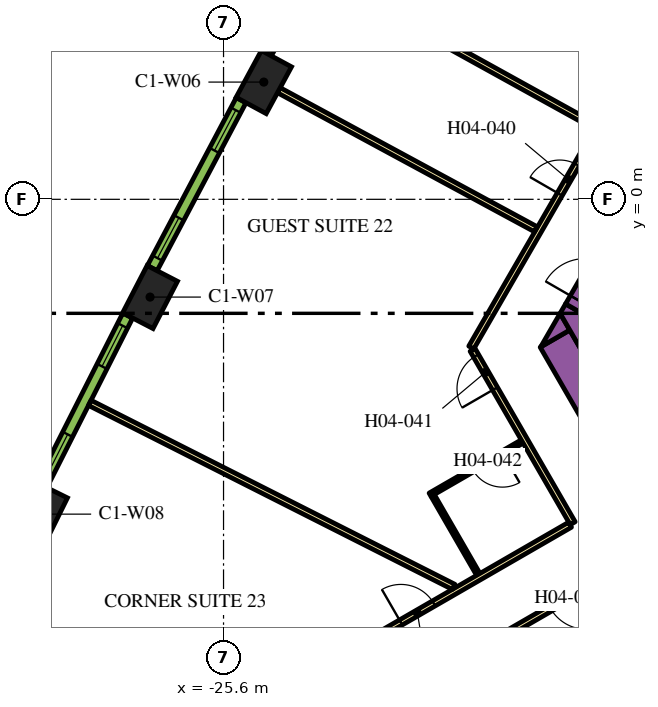
"""IFC4 building model, lengths in metres.
Left out: names, types, materials, properties, quantities, classifications, styles, units other than length and angle.
Written with IfcOpenShell. Run it as: python <this file> out.ifc"""

import sys

from ifc_helpers import new_model, si_unit, direction, frame, frame_2d, origin, origin_2d, place, context, subcontext, project, spatial, polyline, rectangle, outline, extrude, element, fill, save


model = new_model("IFC4")
c1 = context("Model", 3, precision=1e-05, world=origin(), true_north=direction((0.0, 1.0)))
c2 = subcontext(c1, "Body", "Model", "MODEL_VIEW")
j1 = project(units=[si_unit("LENGTHUNIT", "METRE"), si_unit("PLANEANGLEUNIT", "RADIAN")], contexts=[c1])
p1 = place(None, origin())
s1 = spatial("IfcSite", under=j1, at=p1, CompositionType="ELEMENT")
p2 = place(p1, origin())
s2 = spatial("IfcBuilding", under=s1, at=p2, CompositionType="ELEMENT")
p3 = place(p2, frame((0.0, 0.0, 66.6)))
s3 = spatial("IfcBuildingStorey", under=s2, at=p3, CompositionType="ELEMENT", Elevation=66.6)
for number, where, z_axis, x_axis in (
    (1, (-24.54, 3.085, 0.0), (0.0, 0.0, 1.0), (-0.476, -0.88, 0.0)),
    (2, (-27.533, -2.572, 0.0), (0.0, 0.0, 1.0), (-0.459, -0.888, 0.0)),
    (3, (-30.421, -8.284, 0.0), (0.0, 0.0, 1.0), (-0.443, -0.897, 0.0)),
):
    element("IfcColumn", number, at=place(p3, frame(where, z_axis=z_axis, x_axis=x_axis)), inside=s3, PredefinedType="COLUMN", context=c2, shape_type="SweptSolid", body=[
        extrude(rectangle(XDim=1.4, YDim=0.9, at=origin_2d()), origin(), (0.0, 0.0, 1.0), 3.9),
    ])
p4 = place(p3, frame((-12.134, -11.883, 0.0), z_axis=(0.0, 0.0, 1.0), x_axis=(-0.500005339912, 0.866022320763, 0.0)))
e4 = element("IfcWall", 4, at=p4, inside=s3, PredefinedType="SOLIDWALL", context=c2, shape_type="SweptSolid", body=[
    extrude(rectangle(XDim=9.488, YDim=0.9, at=frame_2d((4.744, 0.0))), origin(), (0.0, 0.0, 1.0), 3.9),
])
p5 = place(p3, origin())
e5 = element("IfcWall", 5, at=p5, inside=s3, PredefinedType="SOLIDWALL", context=c2, shape_type="SweptSolid", body=[
    extrude(outline(polyline([(-16.489, -3.44), (-17.251, -3.88), (-16.743, -3.0), (-16.489, -3.44)])), origin(), (0.0, 0.0, 1.0), 3.9),
])
e6 = element("IfcWall", 6, at=p5, inside=s3, PredefinedType="SOLIDWALL", context=c2, shape_type="SweptSolid", body=[
    extrude(outline(polyline([(-15.82, -3.201), (-16.223, -3.9), (-16.743, -3.0), (-16.599, -2.751), (-15.82, -3.201)])), origin(), (0.0, 0.0, 1.0), 3.9),
])
p6 = place(p3, frame((-16.209, -2.976, 0.0), z_axis=(0.0, 0.0, 1.0), x_axis=(0.499954529098, 0.86605165483, 0.0)))
e7 = element("IfcWall", 7, at=p6, inside=s3, PredefinedType="SOLIDWALL", context=c2, shape_type="SweptSolid", body=[
    extrude(rectangle(XDim=1.7, YDim=0.9, at=frame_2d((0.85, 0.0))), origin(), (0.0, 0.0, 1.0), 3.9),
])
p7 = place(p6, frame((0.25, 0.0, 0.0)))
e8 = element("IfcOpeningElement", 8, at=p7, cuts=e7, PredefinedType="OPENING", context=c2, shape_type="SweptSolid", body=[
    extrude(rectangle(XDim=1.2, YDim=2.1, at=frame_2d((0.6, 1.05))), frame((0.0, 0.46, 0.0), z_axis=(0.0, -1.0, 0.0), x_axis=(1.0, 0.0, 0.0)), (0.0, 0.0, 1.0), 0.92),
])
p8 = place(p3, frame((-19.081, -3.9, 0.0), z_axis=(0.0, 0.0, 1.0), x_axis=(0.499998313975, 0.866026377209, 0.0)))
e9 = element("IfcWall", 9, at=p8, inside=s3, PredefinedType="PARTITIONING", context=c2, shape_type="SweptSolid", body=[
    extrude(rectangle(XDim=25.766, YDim=0.15, at=frame_2d((12.883, 0.0))), origin(), (0.0, 0.0, 1.0), 2.75),
])
p9 = place(p8, frame((24.586, 0.0, 0.0)))
e10 = element("IfcOpeningElement", 10, at=p9, cuts=e9, PredefinedType="OPENING", context=c2, shape_type="SweptSolid", body=[
    extrude(rectangle(XDim=1.0, YDim=2.1, at=frame_2d((0.5, 1.05))), frame((0.0, 0.085, 0.0), z_axis=(0.0, -1.0, 0.0), x_axis=(1.0, 0.0, 0.0)), (0.0, 0.0, 1.0), 0.17),
])
p10 = place(p8, frame((9.948, 0.0, 0.0)))
e11 = element("IfcOpeningElement", 11, at=p10, cuts=e9, PredefinedType="OPENING", context=c2, shape_type="SweptSolid", body=[
    extrude(rectangle(XDim=1.0, YDim=2.1, at=frame_2d((0.5, 1.05))), frame((0.0, 0.085, 0.0), z_axis=(0.0, -1.0, 0.0), x_axis=(1.0, 0.0, 0.0)), (0.0, 0.0, 1.0), 0.17),
])
p11 = place(p8, frame((7.782, 0.0, 0.0)))
e12 = element("IfcOpeningElement", 12, at=p11, cuts=e9, PredefinedType="OPENING", context=c2, shape_type="SweptSolid", body=[
    extrude(rectangle(XDim=0.9, YDim=2.1, at=frame_2d((0.45, 1.05))), frame((0.0, 0.085, 0.0), z_axis=(0.0, -1.0, 0.0), x_axis=(1.0, 0.0, 0.0)), (0.0, 0.0, 1.0), 0.17),
])
p12 = place(p8, frame((4.658, 0.0, 0.0)))
e13 = element("IfcOpeningElement", 13, at=p12, cuts=e9, PredefinedType="OPENING", context=c2, shape_type="SweptSolid", body=[
    extrude(rectangle(XDim=0.9, YDim=2.1, at=frame_2d((0.45, 1.05))), frame((0.0, 0.085, 0.0), z_axis=(0.0, -1.0, 0.0), x_axis=(1.0, 0.0, 0.0)), (0.0, 0.0, 1.0), 0.17),
])
p13 = place(p3, frame((-16.412, -8.523, 0.0), z_axis=(0.0, 0.0, 1.0), x_axis=(-0.500001929737, 0.866024289647, 0.0)))
e14 = element("IfcWall", 14, at=p13, inside=s3, PredefinedType="PARTITIONING", context=c2, shape_type="SweptSolid", body=[
    extrude(rectangle(XDim=5.268, YDim=0.15, at=frame_2d((2.634, 0.0))), origin(), (0.0, 0.0, 1.0), 2.75),
])
p14 = place(p13, frame((4.088, 0.0, 0.0)))
e15 = element("IfcOpeningElement", 15, at=p14, cuts=e14, PredefinedType="OPENING", context=c2, shape_type="SweptSolid", body=[
    extrude(rectangle(XDim=1.0, YDim=2.1, at=frame_2d((0.5, 1.05))), frame((0.0, 0.085, 0.0), z_axis=(0.0, -1.0, 0.0), x_axis=(1.0, 0.0, 0.0)), (0.0, 0.0, 1.0), 0.17),
])
p15 = place(p3, frame((-30.463, -16.635, 0.0), z_axis=(0.0, 0.0, 1.0), x_axis=(0.866022394896, 0.500005211512, 0.0)))
e16 = element("IfcWall", 16, at=p15, inside=s3, PredefinedType="PARTITIONING", context=c2, shape_type="SweptSolid", body=[
    extrude(rectangle(XDim=16.144, YDim=0.15, at=frame_2d((8.072, 0.0))), origin(), (0.0, 0.0, 1.0), 2.75),
])
p16 = place(p15, frame((11.004, 0.0, 0.0)))
e17 = element("IfcOpeningElement", 17, at=p16, cuts=e16, PredefinedType="OPENING", context=c2, shape_type="SweptSolid", body=[
    extrude(rectangle(XDim=1.0, YDim=2.1, at=frame_2d((0.5, 1.05))), frame((0.0, 0.085, 0.0), z_axis=(0.0, -1.0, 0.0), x_axis=(1.0, 0.0, 0.0)), (0.0, 0.0, 1.0), 0.17),
])
p17 = place(p3, frame((-15.587, -9.952, 0.0), z_axis=(0.0, 0.0, 1.0), x_axis=(-0.866022197818, -0.500005552856, 0.0)))
e18 = element("IfcWall", 18, at=p17, inside=s3, PredefinedType="PARTITIONING", context=c2, shape_type="SweptSolid", body=[
    extrude(rectangle(XDim=16.224, YDim=0.15, at=frame_2d((8.112, 0.0))), origin(), (0.0, 0.0, 1.0), 2.75),
])
p18 = place(p17, frame((0.527, 0.0, 0.0)))
e19 = element("IfcOpeningElement", 19, at=p18, cuts=e18, PredefinedType="OPENING", context=c2, shape_type="SweptSolid", body=[
    extrude(rectangle(XDim=1.1, YDim=2.1, at=frame_2d((0.55, 1.05))), frame((0.0, 0.085, 0.0), z_axis=(0.0, -1.0, 0.0), x_axis=(1.0, 0.0, 0.0)), (0.0, 0.0, 1.0), 0.17),
])
p19 = place(p3, frame((-29.12, -5.356, 0.0), z_axis=(0.0, 0.0, 1.0), x_axis=(0.892401965553, -0.451241323327, 0.0)))
e20 = element("IfcWall", 20, at=p19, inside=s3, PredefinedType="PARTITIONING", context=c2, shape_type="SweptSolid", body=[
    extrude(rectangle(XDim=10.729, YDim=0.15, at=frame_2d((5.364, 0.0))), origin(), (0.0, 0.0, 1.0), 2.75),
])
p20 = place(p3, frame((-24.145, 2.871, 0.0), z_axis=(0.0, 0.0, 1.0), x_axis=(0.879551725039, -0.475803281809, 0.0)))
e21 = element("IfcWall", 21, at=p20, inside=s3, PredefinedType="PARTITIONING", context=c2, shape_type="SweptSolid", body=[
    extrude(rectangle(XDim=7.688, YDim=0.15, at=frame_2d((3.844, 0.0))), origin(), (0.0, 0.0, 1.0), 2.75),
])
p21 = place(p3, frame((-23.132, 5.962, 0.0), z_axis=(0.0, 0.0, 1.0), x_axis=(0.875121716713, -0.483902863121, 0.0)))
e22 = element("IfcWall", 22, at=p21, inside=s3, PredefinedType="PARTITIONING", context=c2, shape_type="SweptSolid", body=[
    extrude(rectangle(XDim=8.355, YDim=0.15, at=frame_2d((4.178, 0.0))), origin(), (0.0, 0.0, 1.0), 2.75),
])
p22 = place(p3, frame((-17.74, -6.373, 0.0), z_axis=(0.0, 0.0, 1.0), x_axis=(-0.866018616679, -0.500011755427, 0.0)))
e23 = element("IfcWall", 23, at=p22, inside=s3, PredefinedType="PARTITIONING", context=c2, shape_type="SweptSolid", body=[
    extrude(rectangle(XDim=2.8, YDim=0.1, at=frame_2d((1.4, 0.0))), origin(), (0.0, 0.0, 1.0), 2.75),
])
p23 = place(p22, frame((0.6, 0.0, 0.0)))
e24 = element("IfcOpeningElement", 24, at=p23, cuts=e23, PredefinedType="OPENING", context=c2, shape_type="SweptSolid", body=[
    extrude(rectangle(XDim=0.9, YDim=2.1, at=frame_2d((0.45, 1.05))), frame((0.0, 0.06, 0.0), z_axis=(0.0, -1.0, 0.0), x_axis=(1.0, 0.0, 0.0)), (0.0, 0.0, 1.0), 0.12),
])
p24 = place(p3, frame((-20.092, -7.8, 0.0), z_axis=(0.0, 0.0, 1.0), x_axis=(0.499940577336, -0.866059708757, 0.0)))
e25 = element("IfcWall", 25, at=p24, inside=s3, PredefinedType="PARTITIONING", context=c2, shape_type="SweptSolid", body=[
    extrude(rectangle(XDim=2.39, YDim=0.1, at=frame_2d((1.195, 0.0))), origin(), (0.0, 0.0, 1.0), 2.75),
])
p25 = place(p3, frame((-22.05, 8.22, 0.0), z_axis=(0.0, 0.0, 1.0), x_axis=(-0.483912572871, -0.875116347589, 0.0)))
e26 = element("IfcWall", 26, at=p25, inside=s3, PredefinedType="SOLIDWALL", context=c2, shape_type="SweptSolid", body=[
    extrude(rectangle(XDim=4.998, YDim=0.29, at=frame_2d((2.499, 0.0))), origin(), (0.0, 0.0, 1.0), 3.65),
])
p26 = place(p25, frame((0.297, 0.0, 0.9)))
e27 = element("IfcOpeningElement", 27, at=p26, cuts=e26, PredefinedType="OPENING", context=c2, shape_type="SweptSolid", body=[
    extrude(rectangle(XDim=1.2, YDim=2.15, at=frame_2d((0.6, 1.075))), frame((0.0, 0.155, 0.0), z_axis=(0.0, -1.0, 0.0), x_axis=(1.0, 0.0, 0.0)), (0.0, 0.0, 1.0), 0.31),
])
p27 = place(p25, frame((3.501, 0.0, 0.9)))
e28 = element("IfcOpeningElement", 28, at=p27, cuts=e26, PredefinedType="OPENING", context=c2, shape_type="SweptSolid", body=[
    extrude(rectangle(XDim=1.2, YDim=2.15, at=frame_2d((0.6, 1.075))), frame((0.0, 0.155, 0.0), z_axis=(0.0, -1.0, 0.0), x_axis=(1.0, 0.0, 0.0)), (0.0, 0.0, 1.0), 0.31),
])
p28 = place(p3, frame((-25.138, 2.608, 0.0), z_axis=(0.0, 0.0, 1.0), x_axis=(-0.467629620899, -0.883924509026, 0.0)))
e29 = element("IfcWall", 29, at=p28, inside=s3, PredefinedType="SOLIDWALL", context=c2, shape_type="SweptSolid", body=[
    extrude(rectangle(XDim=4.998, YDim=0.29, at=frame_2d((2.499, 0.0))), origin(), (0.0, 0.0, 1.0), 3.65),
])
p29 = place(p28, frame((0.297, 0.0, 0.9)))
e30 = element("IfcOpeningElement", 30, at=p29, cuts=e29, PredefinedType="OPENING", context=c2, shape_type="SweptSolid", body=[
    extrude(rectangle(XDim=1.2, YDim=2.15, at=frame_2d((0.6, 1.075))), frame((0.0, 0.155, 0.0), z_axis=(0.0, -1.0, 0.0), x_axis=(1.0, 0.0, 0.0)), (0.0, 0.0, 1.0), 0.31),
])
p30 = place(p28, frame((3.501, 0.0, 0.9)))
e31 = element("IfcOpeningElement", 31, at=p30, cuts=e29, PredefinedType="OPENING", context=c2, shape_type="SweptSolid", body=[
    extrude(rectangle(XDim=1.2, YDim=2.15, at=frame_2d((0.6, 1.075))), frame((0.0, 0.155, 0.0), z_axis=(0.0, -1.0, 0.0), x_axis=(1.0, 0.0, 0.0)), (0.0, 0.0, 1.0), 0.31),
])
p31 = place(p3, frame((-28.122, -3.06, 0.0), z_axis=(0.0, 0.0, 1.0), x_axis=(-0.451233929645, -0.892405704115, 0.0)))
e32 = element("IfcWall", 32, at=p31, inside=s3, PredefinedType="SOLIDWALL", context=c2, shape_type="SweptSolid", body=[
    extrude(rectangle(XDim=4.998, YDim=0.29, at=frame_2d((2.499, 0.0))), origin(), (0.0, 0.0, 1.0), 3.65),
])
p32 = place(p31, frame((0.297, 0.0, 0.9)))
e33 = element("IfcOpeningElement", 33, at=p32, cuts=e32, PredefinedType="OPENING", context=c2, shape_type="SweptSolid", body=[
    extrude(rectangle(XDim=1.2, YDim=2.15, at=frame_2d((0.6, 1.075))), frame((0.0, 0.155, 0.0), z_axis=(0.0, -1.0, 0.0), x_axis=(1.0, 0.0, 0.0)), (0.0, 0.0, 1.0), 0.31),
])
p33 = place(p31, frame((3.501, 0.0, 0.9)))
e34 = element("IfcOpeningElement", 34, at=p33, cuts=e32, PredefinedType="OPENING", context=c2, shape_type="SweptSolid", body=[
    extrude(rectangle(XDim=1.2, YDim=2.15, at=frame_2d((0.6, 1.075))), frame((0.0, 0.155, 0.0), z_axis=(0.0, -1.0, 0.0), x_axis=(1.0, 0.0, 0.0)), (0.0, 0.0, 1.0), 0.31),
])
p34 = place(p18, origin())
e35 = element("IfcDoor", 35, at=p34, inside=s3, OperationType="SINGLE_SWING_LEFT", PredefinedType="DOOR", context=c2, shape_type="SweptSolid", body=[
    extrude(rectangle(XDim=1.1, YDim=2.1, at=frame_2d((0.55, 1.05))), frame((0.0, 0.025, 0.0), z_axis=(0.0, -1.0, 0.0), x_axis=(1.0, 0.0, 0.0)), (0.0, 0.0, 1.0), 0.05),
])
fill(e19, e35)
p35 = place(p12, origin())
e36 = element("IfcDoor", 36, at=p35, inside=s3, OperationType="SINGLE_SWING_LEFT", PredefinedType="DOOR", context=c2, shape_type="SweptSolid", body=[
    extrude(rectangle(XDim=0.9, YDim=2.1, at=frame_2d((0.45, 1.05))), frame((0.0, 0.025, 0.0), z_axis=(0.0, -1.0, 0.0), x_axis=(1.0, 0.0, 0.0)), (0.0, 0.0, 1.0), 0.05),
])
fill(e13, e36)
p36 = place(p14, origin())
e37 = element("IfcDoor", 37, at=p36, inside=s3, OperationType="SINGLE_SWING_RIGHT", PredefinedType="DOOR", context=c2, shape_type="SweptSolid", body=[
    extrude(rectangle(XDim=1.0, YDim=2.1, at=frame_2d((0.5, 1.05))), frame((0.0, 0.025, 0.0), z_axis=(0.0, -1.0, 0.0), x_axis=(1.0, 0.0, 0.0)), (0.0, 0.0, 1.0), 0.05),
])
fill(e15, e37)
p37 = place(p23, origin())
e38 = element("IfcDoor", 38, at=p37, inside=s3, OperationType="SINGLE_SWING_LEFT", PredefinedType="DOOR", context=c2, shape_type="SweptSolid", body=[
    extrude(rectangle(XDim=0.9, YDim=2.1, at=frame_2d((0.45, 1.05))), frame((0.0, 0.025, 0.0), z_axis=(0.0, -1.0, 0.0), x_axis=(1.0, 0.0, 0.0)), (0.0, 0.0, 1.0), 0.05),
])
fill(e24, e38)
p38 = place(p16, origin())
e39 = element("IfcDoor", 39, at=p38, inside=s3, OperationType="SINGLE_SWING_RIGHT", PredefinedType="DOOR", context=c2, shape_type="SweptSolid", body=[
    extrude(rectangle(XDim=1.0, YDim=2.1, at=frame_2d((0.5, 1.05))), frame((0.0, 0.025, 0.0), z_axis=(0.0, -1.0, 0.0), x_axis=(1.0, 0.0, 0.0)), (0.0, 0.0, 1.0), 0.05),
])
fill(e17, e39)
p39 = place(p29, origin())
e40 = element("IfcWindow", 40, at=p39, inside=s3, PartitioningType="DOUBLE_PANEL_VERTICAL", PredefinedType="WINDOW", context=c2, shape_type="SweptSolid", body=[
    extrude(rectangle(XDim=1.2, YDim=2.15, at=frame_2d((0.6, 1.075))), frame((0.0, 0.015, 0.0), z_axis=(0.0, -1.0, 0.0), x_axis=(1.0, 0.0, 0.0)), (0.0, 0.0, 1.0), 0.06),
])
fill(e30, e40)
p40 = place(p30, origin())
e41 = element("IfcWindow", 41, at=p40, inside=s3, PartitioningType="DOUBLE_PANEL_VERTICAL", PredefinedType="WINDOW", context=c2, shape_type="SweptSolid", body=[
    extrude(rectangle(XDim=1.2, YDim=2.15, at=frame_2d((0.6, 1.075))), frame((0.0, 0.015, 0.0), z_axis=(0.0, -1.0, 0.0), x_axis=(1.0, 0.0, 0.0)), (0.0, 0.0, 1.0), 0.06),
])
fill(e31, e41)
p41 = place(p32, origin())
e42 = element("IfcWindow", 42, at=p41, inside=s3, PartitioningType="DOUBLE_PANEL_VERTICAL", PredefinedType="WINDOW", context=c2, shape_type="SweptSolid", body=[
    extrude(rectangle(XDim=1.2, YDim=2.15, at=frame_2d((0.6, 1.075))), frame((0.0, 0.015, 0.0), z_axis=(0.0, -1.0, 0.0), x_axis=(1.0, 0.0, 0.0)), (0.0, 0.0, 1.0), 0.06),
])
fill(e33, e42)
p42 = place(p33, origin())
e43 = element("IfcWindow", 43, at=p42, inside=s3, PartitioningType="DOUBLE_PANEL_VERTICAL", PredefinedType="WINDOW", context=c2, shape_type="SweptSolid", body=[
    extrude(rectangle(XDim=1.2, YDim=2.15, at=frame_2d((0.6, 1.075))), frame((0.0, 0.015, 0.0), z_axis=(0.0, -1.0, 0.0), x_axis=(1.0, 0.0, 0.0)), (0.0, 0.0, 1.0), 0.06),
])
fill(e34, e43)
save(model, sys.argv[1])
